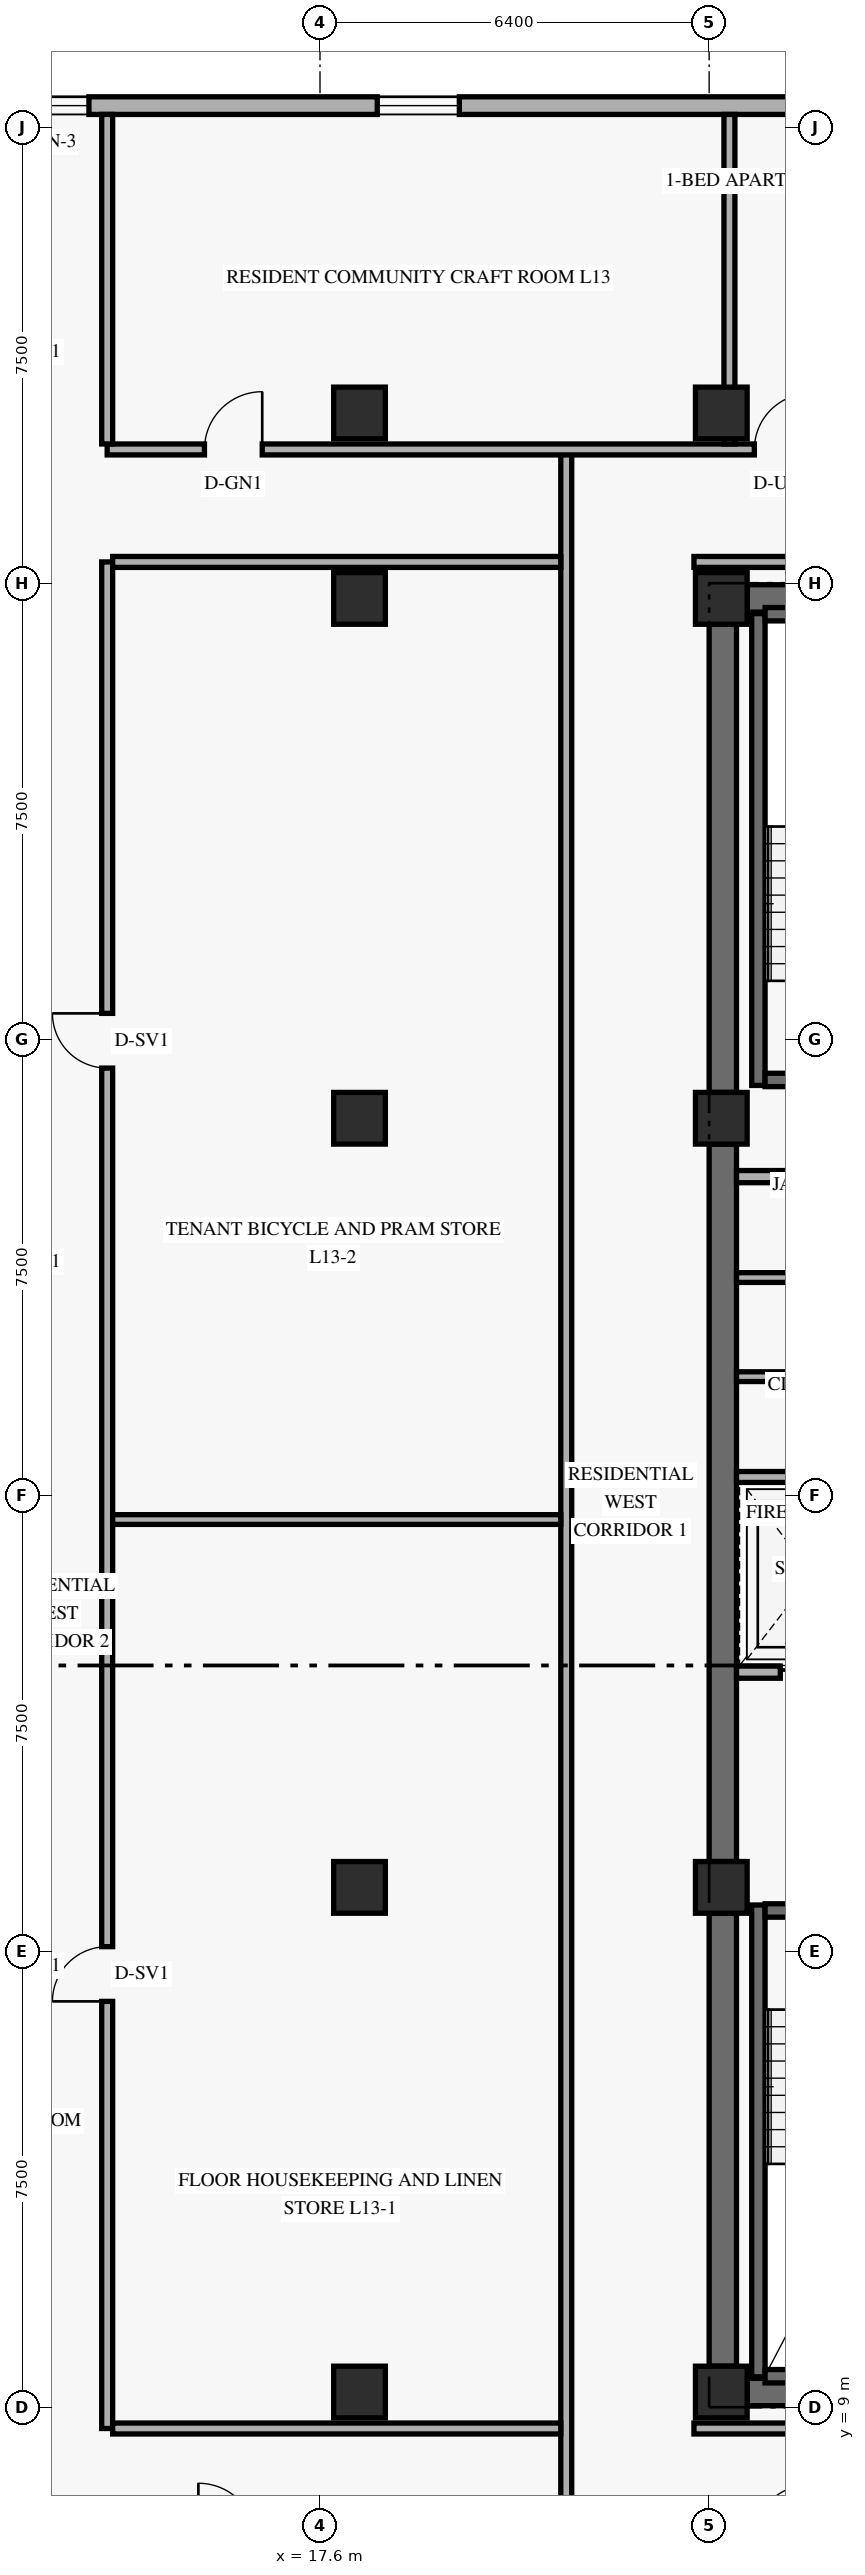
"""IFC4 building model, lengths in metres.
Left out: names, types, materials, properties, quantities, classifications, styles, units other than length and angle.
Written with IfcOpenShell. Run it as: python <this file> out.ifc"""

import sys

from ifc_helpers import new_model, si_unit, direction, frame, frame_2d, origin, origin_2d, place, context, subcontext, project, spatial, rectangle, extrude, element, fill, save


model = new_model("IFC4")
c1 = context("Model", 3, precision=1e-05, world=origin(), true_north=direction((0.0, 1.0)))
c2 = subcontext(c1, "Body", "Model", "MODEL_VIEW")
j1 = project(units=[si_unit("LENGTHUNIT", "METRE"), si_unit("PLANEANGLEUNIT", "RADIAN")], contexts=[c1])
p1 = place(None, origin())
s1 = spatial("IfcSite", under=j1, at=p1, CompositionType="ELEMENT")
p2 = place(p1, origin())
s2 = spatial("IfcBuilding", under=s1, at=p2, CompositionType="ELEMENT")
p3 = place(p2, frame((0.0, 0.0, 52.8)))
s3 = spatial("IfcBuildingStorey", under=s2, at=p3, CompositionType="ELEMENT", Elevation=52.8)
p4 = place(p3, frame((24.225, 9.675, 0.0), z_axis=(0.0, 0.0, 1.0), x_axis=(0.0, 1.0, 0.0)))
e1 = element("IfcWall", 1, at=p4, inside=s3, PredefinedType="SHEAR", context=c2, shape_type="SweptSolid", body=[
    extrude(rectangle(XDim=7.45, YDim=0.45, at=frame_2d((3.725, 0.0))), origin(), (0.0, 0.0, 1.0), 2.667),
])
p5 = place(p3, frame((24.225, 17.975, 0.0), z_axis=(0.0, 0.0, 1.0), x_axis=(0.0, 1.0, 0.0)))
e2 = element("IfcWall", 2, at=p5, inside=s3, PredefinedType="SHEAR", context=c2, shape_type="SweptSolid", body=[
    extrude(rectangle(XDim=11.8, YDim=0.45, at=frame_2d((5.9, 0.0))), origin(), (0.0, 0.0, 1.0), 2.667),
])
p6 = place(p3, frame((24.225, 30.625, 0.0), z_axis=(0.0, 0.0, 1.0), x_axis=(0.0, 1.0, 0.0)))
e3 = element("IfcWall", 3, at=p6, inside=s3, PredefinedType="SHEAR", context=c2, shape_type="SweptSolid", body=[
    extrude(rectangle(XDim=7.7, YDim=0.45, at=frame_2d((3.85, 0.0))), origin(), (0.0, 0.0, 1.0), 2.667),
])
for number, where, z_axis, x_axis in (
    (4, (24.625, 9.25, 0.0), (0.0, 0.0, 1.0), (1.0, 0.0, 0.0)),
    (5, (24.625, 38.75, 0.0), (0.0, 0.0, 1.0), (1.0, 0.0, 0.0)),
):
    element("IfcWall", number, at=place(p3, frame(where, z_axis=z_axis, x_axis=x_axis)), inside=s3, PredefinedType="SHEAR", context=c2, shape_type="SweptSolid", body=[
        extrude(rectangle(XDim=10.15, YDim=0.45, at=frame_2d((5.075, 0.0))), origin(), (0.0, 0.0, 1.0), 3.36),
    ])
p7 = place(p3, frame((24.81, 9.5, 0.0), z_axis=(0.0, 0.0, 1.0), x_axis=(0.0, 1.0, 0.0)))
e6 = element("IfcWall", 6, at=p7, inside=s3, PredefinedType="SHEAR", context=c2, shape_type="SweptSolid", body=[
    extrude(rectangle(XDim=7.76, YDim=0.22, at=frame_2d((3.88, 0.0))), origin(), (0.0, 0.0, 1.0), 3.36),
])
p8 = place(p3, frame((24.92, 9.51, 0.0), z_axis=(0.0, 0.0, 1.0), x_axis=(1.0, 0.0, 0.0)))
e7 = element("IfcWall", 7, at=p8, inside=s3, PredefinedType="SHEAR", context=c2, shape_type="SweptSolid", body=[
    extrude(rectangle(XDim=3.16, YDim=0.22, at=frame_2d((1.58, 0.0))), origin(), (0.0, 0.0, 1.0), 3.36),
])
p9 = place(p3, frame((24.92, 17.17, 0.0), z_axis=(0.0, 0.0, 1.0), x_axis=(1.0, 0.0, 0.0)))
e8 = element("IfcWall", 8, at=p9, inside=s3, PredefinedType="SHEAR", context=c2, shape_type="SweptSolid", body=[
    extrude(rectangle(XDim=3.16, YDim=0.22, at=frame_2d((1.58, 0.0))), origin(), (0.0, 0.0, 1.0), 3.36),
])
p10 = place(p9, frame((0.78, 0.0, 0.0)))
e9 = element("IfcOpeningElement", 9, at=p10, cuts=e8, PredefinedType="OPENING", context=c2, shape_type="SweptSolid", body=[
    extrude(rectangle(XDim=1.05, YDim=2.15, at=frame_2d((0.525, 1.075))), frame((0.0, 0.12, 0.0), z_axis=(0.0, -1.0, 0.0), x_axis=(1.0, 0.0, 0.0)), (0.0, 0.0, 1.0), 0.24),
])
p11 = place(p3, frame((24.81, 30.74, 0.0), z_axis=(0.0, 0.0, 1.0), x_axis=(0.0, 1.0, 0.0)))
e10 = element("IfcWall", 10, at=p11, inside=s3, PredefinedType="SHEAR", context=c2, shape_type="SweptSolid", body=[
    extrude(rectangle(XDim=7.76, YDim=0.22, at=frame_2d((3.88, 0.0))), origin(), (0.0, 0.0, 1.0), 3.36),
])
p12 = place(p3, frame((24.92, 30.83, 0.0), z_axis=(0.0, 0.0, 1.0), x_axis=(1.0, 0.0, 0.0)))
e11 = element("IfcWall", 11, at=p12, inside=s3, PredefinedType="SHEAR", context=c2, shape_type="SweptSolid", body=[
    extrude(rectangle(XDim=3.16, YDim=0.22, at=frame_2d((1.58, 0.0))), origin(), (0.0, 0.0, 1.0), 3.36),
])
p13 = place(p12, frame((0.78, 0.0, 0.0)))
e12 = element("IfcOpeningElement", 12, at=p13, cuts=e11, PredefinedType="OPENING", context=c2, shape_type="SweptSolid", body=[
    extrude(rectangle(XDim=1.05, YDim=2.15, at=frame_2d((0.525, 1.075))), frame((0.0, 0.12, 0.0), z_axis=(0.0, -1.0, 0.0), x_axis=(1.0, 0.0, 0.0)), (0.0, 0.0, 1.0), 0.24),
])
p14 = place(p3, frame((24.92, 38.49, 0.0), z_axis=(0.0, 0.0, 1.0), x_axis=(1.0, 0.0, 0.0)))
e13 = element("IfcWall", 13, at=p14, inside=s3, PredefinedType="SHEAR", context=c2, shape_type="SweptSolid", body=[
    extrude(rectangle(XDim=3.16, YDim=0.22, at=frame_2d((1.58, 0.0))), origin(), (0.0, 0.0, 1.0), 3.36),
])
for number, where, z_axis, x_axis in (
    (14, (18.25, 9.25, 0.0), (0.0, 0.0, 1.0), (1.0, 0.0, 0.0)),
    (15, (18.25, 17.55, 0.0), (0.0, 0.0, 1.0), (1.0, 0.0, 0.0)),
    (16, (18.25, 30.2, 0.0), (0.0, 0.0, 1.0), (1.0, 0.0, 0.0)),
    (17, (18.25, 38.75, 0.0), (0.0, 0.0, 1.0), (1.0, 0.0, 0.0)),
    (18, (18.25, 41.8, 0.0), (0.0, 0.0, 1.0), (1.0, 0.0, 0.0)),
    (19, (24.2, 9.25, 0.0), (0.0, 0.0, 1.0), (1.0, 0.0, 0.0)),
    (20, (24.2, 17.55, 0.0), (0.0, 0.0, 1.0), (1.0, 0.0, 0.0)),
    (21, (24.2, 30.2, 0.0), (0.0, 0.0, 1.0), (1.0, 0.0, 0.0)),
    (22, (24.2, 38.75, 0.0), (0.0, 0.0, 1.0), (1.0, 0.0, 0.0)),
    (23, (24.2, 41.8, 0.0), (0.0, 0.0, 1.0), (1.0, 0.0, 0.0)),
):
    element("IfcColumn", number, at=place(p3, frame(where, z_axis=z_axis, x_axis=x_axis)), inside=s3, PredefinedType="COLUMN", context=c2, shape_type="SweptSolid", body=[
        extrude(rectangle(XDim=0.85, YDim=0.85, at=origin_2d()), origin(), (0.0, 0.0, 1.0), 3.6),
    ])
p15 = place(p3, frame((44.98, 46.855, 0.0), z_axis=(0.0, 0.0, 1.0), x_axis=(-1.0, 0.0, 0.0)))
e24 = element("IfcWall", 24, at=p15, inside=s3, PredefinedType="SOLIDWALL", context=c2, shape_type="SweptSolid", body=[
    extrude(rectangle(XDim=39.56, YDim=0.29, at=frame_2d((19.78, 0.0))), origin(), (0.0, 0.0, 1.0), 3.36),
])
p16 = place(p15, frame((35.445, 0.0, 0.85)))
e25 = element("IfcOpeningElement", 25, at=p16, cuts=e24, PredefinedType="OPENING", context=c2, shape_type="SweptSolid", body=[
    extrude(rectangle(XDim=1.35, YDim=1.55, at=frame_2d((0.675, 0.775))), frame((0.0, 0.155, 0.0), z_axis=(0.0, -1.0, 0.0), x_axis=(1.0, 0.0, 0.0)), (0.0, 0.0, 1.0), 0.31),
])
p17 = place(p15, frame((31.18, 0.0, 0.85)))
e26 = element("IfcOpeningElement", 26, at=p17, cuts=e24, PredefinedType="OPENING", context=c2, shape_type="SweptSolid", body=[
    extrude(rectangle(XDim=1.2, YDim=1.5, at=frame_2d((0.6, 0.75))), frame((0.0, 0.155, 0.0), z_axis=(0.0, -1.0, 0.0), x_axis=(1.0, 0.0, 0.0)), (0.0, 0.0, 1.0), 0.31),
])
p18 = place(p15, frame((25.088, 0.0, 0.85)))
e27 = element("IfcOpeningElement", 27, at=p18, cuts=e24, PredefinedType="OPENING", context=c2, shape_type="SweptSolid", body=[
    extrude(rectangle(XDim=1.35, YDim=1.55, at=frame_2d((0.675, 0.775))), frame((0.0, 0.155, 0.0), z_axis=(0.0, -1.0, 0.0), x_axis=(1.0, 0.0, 0.0)), (0.0, 0.0, 1.0), 0.31),
])
p19 = place(p15, frame((16.498, 0.0, 0.85)))
e28 = element("IfcOpeningElement", 28, at=p19, cuts=e24, PredefinedType="OPENING", context=c2, shape_type="SweptSolid", body=[
    extrude(rectangle(XDim=1.35, YDim=1.55, at=frame_2d((0.675, 0.775))), frame((0.0, 0.155, 0.0), z_axis=(0.0, -1.0, 0.0), x_axis=(1.0, 0.0, 0.0)), (0.0, 0.0, 1.0), 0.31),
])
p20 = place(p15, frame((10.955, 0.0, 0.85)))
e29 = element("IfcOpeningElement", 29, at=p20, cuts=e24, PredefinedType="OPENING", context=c2, shape_type="SweptSolid", body=[
    extrude(rectangle(XDim=1.35, YDim=1.55, at=frame_2d((0.675, 0.775))), frame((0.0, 0.155, 0.0), z_axis=(0.0, -1.0, 0.0), x_axis=(1.0, 0.0, 0.0)), (0.0, 0.0, 1.0), 0.31),
])
p21 = place(p15, frame((7.82, 0.0, 0.85)))
e30 = element("IfcOpeningElement", 30, at=p21, cuts=e24, PredefinedType="OPENING", context=c2, shape_type="SweptSolid", body=[
    extrude(rectangle(XDim=1.35, YDim=1.55, at=frame_2d((0.675, 0.775))), frame((0.0, 0.155, 0.0), z_axis=(0.0, -1.0, 0.0), x_axis=(1.0, 0.0, 0.0)), (0.0, 0.0, 1.0), 0.31),
])
p22 = place(p15, frame((4.008, 0.0, 0.85)))
e31 = element("IfcOpeningElement", 31, at=p22, cuts=e24, PredefinedType="OPENING", context=c2, shape_type="SweptSolid", body=[
    extrude(rectangle(XDim=1.35, YDim=1.55, at=frame_2d((0.675, 0.775))), frame((0.0, 0.155, 0.0), z_axis=(0.0, -1.0, 0.0), x_axis=(1.0, 0.0, 0.0)), (0.0, 0.0, 1.0), 0.31),
])
p23 = place(p15, frame((0.292, 0.0, 0.85)))
e32 = element("IfcOpeningElement", 32, at=p23, cuts=e24, PredefinedType="OPENING", context=c2, shape_type="SweptSolid", body=[
    extrude(rectangle(XDim=1.35, YDim=1.55, at=frame_2d((0.675, 0.775))), frame((0.0, 0.155, 0.0), z_axis=(0.0, -1.0, 0.0), x_axis=(1.0, 0.0, 0.0)), (0.0, 0.0, 1.0), 0.31),
])
p24 = place(p3, frame((24.45, 21.09, 0.0), z_axis=(0.0, 0.0, 1.0), x_axis=(1.0, 0.0, 0.0)))
e33 = element("IfcWall", 33, at=p24, inside=s3, PredefinedType="STANDARD", context=c2, shape_type="SweptSolid", body=[
    extrude(rectangle(XDim=6.83, YDim=0.2, at=frame_2d((3.415, 0.0))), origin(), (0.0, 0.0, 1.0), 3.36),
])
p25 = place(p24, frame((0.72, 0.0, 0.0)))
e34 = element("IfcOpeningElement", 34, at=p25, cuts=e33, PredefinedType="OPENING", context=c2, shape_type="SweptSolid", body=[
    extrude(rectangle(XDim=1.1, YDim=2.2, at=frame_2d((0.55, 1.1))), frame((0.0, 0.11, 0.0), z_axis=(0.0, -1.0, 0.0), x_axis=(1.0, 0.0, 0.0)), (0.0, 0.0, 1.0), 0.22),
])
p26 = place(p24, frame((3.32, 0.0, 0.0)))
e35 = element("IfcOpeningElement", 35, at=p26, cuts=e33, PredefinedType="OPENING", context=c2, shape_type="SweptSolid", body=[
    extrude(rectangle(XDim=1.1, YDim=2.2, at=frame_2d((0.55, 1.1))), frame((0.0, 0.11, 0.0), z_axis=(0.0, -1.0, 0.0), x_axis=(1.0, 0.0, 0.0)), (0.0, 0.0, 1.0), 0.22),
])
p27 = place(p3, frame((24.45, 24.3, 0.0), z_axis=(0.0, 0.0, 1.0), x_axis=(1.0, 0.0, 0.0)))
e36 = element("IfcWall", 36, at=p27, inside=s3, PredefinedType="STANDARD", context=c2, shape_type="SweptSolid", body=[
    extrude(rectangle(XDim=6.83, YDim=0.18, at=frame_2d((3.415, 0.0))), origin(), (0.0, 0.0, 1.0), 3.36),
])
p28 = place(p3, frame((24.45, 29.24, 0.0), z_axis=(0.0, 0.0, 1.0), x_axis=(1.0, 0.0, 0.0)))
e37 = element("IfcWall", 37, at=p28, inside=s3, PredefinedType="STANDARD", context=c2, shape_type="SweptSolid", body=[
    extrude(rectangle(XDim=3.65, YDim=0.2, at=frame_2d((1.825, 0.0))), origin(), (0.0, 0.0, 1.0), 3.36),
])
for number, where, z_axis, x_axis in (
    (38, (24.45, 25.95, 0.0), (0.0, 0.0, 1.0), (1.0, 0.0, 0.0)),
    (39, (24.45, 27.58, 0.0), (0.0, 0.0, 1.0), (1.0, 0.0, 0.0)),
):
    element("IfcWall", number, at=place(p3, frame(where, z_axis=z_axis, x_axis=x_axis)), inside=s3, PredefinedType="PARTITIONING", context=c2, shape_type="SweptSolid", body=[
        extrude(rectangle(XDim=3.55, YDim=0.16, at=frame_2d((1.775, 0.0))), origin(), (0.0, 0.0, 1.0), 3.36),
    ])
p29 = place(p3, frame((21.65, 6.8, 0.0), z_axis=(0.0, 0.0, 1.0), x_axis=(0.0, 1.0, 0.0)))
e40 = element("IfcWall", 40, at=p29, inside=s3, PredefinedType="STANDARD", context=c2, shape_type="SweptSolid", body=[
    extrude(rectangle(XDim=34.4, YDim=0.18, at=frame_2d((17.2, 0.0))), origin(), (0.0, 0.0, 1.0), 2.649),
])
p30 = place(p3, frame((23.75, 8.65, 0.0), z_axis=(0.0, 0.0, 1.0), x_axis=(1.0, 0.0, 0.0)))
e41 = element("IfcWall", 41, at=p30, inside=s3, PredefinedType="STANDARD", context=c2, shape_type="SweptSolid", body=[
    extrude(rectangle(XDim=11.67, YDim=0.18, at=frame_2d((5.835, 0.0))), origin(), (0.0, 0.0, 1.0), 2.649),
])
p31 = place(p3, frame((14.1, 41.2, 0.0), z_axis=(0.0, 0.0, 1.0), x_axis=(1.0, 0.0, 0.0)))
e42 = element("IfcWall", 42, at=p31, inside=s3, PredefinedType="STANDARD", context=c2, shape_type="SweptSolid", body=[
    extrude(rectangle(XDim=21.32, YDim=0.18, at=frame_2d((10.66, 0.0))), origin(), (0.0, 0.0, 1.0), 2.649),
])
p32 = place(p31, frame((1.6, 0.0, 0.0)))
e43 = element("IfcOpeningElement", 43, at=p32, cuts=e42, PredefinedType="OPENING", context=c2, shape_type="SweptSolid", body=[
    extrude(rectangle(XDim=0.95, YDim=2.15, at=frame_2d((0.475, 1.075))), frame((0.0, 0.1, 0.0), z_axis=(0.0, -1.0, 0.0), x_axis=(1.0, 0.0, 0.0)), (0.0, 0.0, 1.0), 0.2),
])
p33 = place(p31, frame((10.644, 0.0, 0.0)))
e44 = element("IfcOpeningElement", 44, at=p33, cuts=e42, PredefinedType="OPENING", context=c2, shape_type="SweptSolid", body=[
    extrude(rectangle(XDim=0.92, YDim=2.15, at=frame_2d((0.46, 1.075))), frame((0.0, 0.1, 0.0), z_axis=(0.0, -1.0, 0.0), x_axis=(1.0, 0.0, 0.0)), (0.0, 0.0, 1.0), 0.2),
])
p34 = place(p3, frame((23.75, 39.35, 0.0), z_axis=(0.0, 0.0, 1.0), x_axis=(1.0, 0.0, 0.0)))
e45 = element("IfcWall", 45, at=p34, inside=s3, PredefinedType="STANDARD", context=c2, shape_type="SweptSolid", body=[
    extrude(rectangle(XDim=11.67, YDim=0.18, at=frame_2d((5.835, 0.0))), origin(), (0.0, 0.0, 1.0), 2.649),
])
p35 = place(p3, frame((14.1, 8.65, 0.0), z_axis=(0.0, 0.0, 1.0), x_axis=(0.0, 1.0, 0.0)))
e46 = element("IfcWall", 46, at=p35, inside=s3, PredefinedType="STANDARD", context=c2, shape_type="SweptSolid", body=[
    extrude(rectangle(XDim=30.7, YDim=0.18, at=frame_2d((15.35, 0.0))), origin(), (0.0, 0.0, 1.0), 2.649),
])
p36 = place(p35, frame((7.025, 0.0, 0.0)))
e47 = element("IfcOpeningElement", 47, at=p36, cuts=e46, PredefinedType="OPENING", context=c2, shape_type="SweptSolid", body=[
    extrude(rectangle(XDim=0.9, YDim=2.1, at=frame_2d((0.45, 1.05))), frame((0.0, 0.1, 0.0), z_axis=(0.0, -1.0, 0.0), x_axis=(1.0, 0.0, 0.0)), (0.0, 0.0, 1.0), 0.2),
])
p37 = place(p35, frame((22.375, 0.0, 0.0)))
e48 = element("IfcOpeningElement", 48, at=p37, cuts=e46, PredefinedType="OPENING", context=c2, shape_type="SweptSolid", body=[
    extrude(rectangle(XDim=0.9, YDim=2.1, at=frame_2d((0.45, 1.05))), frame((0.0, 0.1, 0.0), z_axis=(0.0, -1.0, 0.0), x_axis=(1.0, 0.0, 0.0)), (0.0, 0.0, 1.0), 0.2),
])
for number, where, z_axis, x_axis in (
    (49, (14.19, 8.65, 0.0), (0.0, 0.0, 1.0), (1.0, 0.0, 0.0)),
    (50, (14.19, 39.35, 0.0), (0.0, 0.0, 1.0), (1.0, 0.0, 0.0)),
):
    element("IfcWall", number, at=place(p3, frame(where, z_axis=z_axis, x_axis=x_axis)), inside=s3, PredefinedType="STANDARD", context=c2, shape_type="SweptSolid", body=[
        extrude(rectangle(XDim=7.37, YDim=0.18, at=frame_2d((3.685, 0.0))), origin(), (0.0, 0.0, 1.0), 2.649),
    ])
p38 = place(p3, frame((14.1, 41.29, 0.0), z_axis=(0.0, 0.0, 1.0), x_axis=(0.0, 1.0, 0.0)))
e51 = element("IfcWall", 51, at=p38, inside=s3, PredefinedType="PARTITIONING", context=c2, shape_type="SweptSolid", body=[
    extrude(rectangle(XDim=5.42, YDim=0.18, at=frame_2d((2.71, 0.0))), origin(), (0.0, 0.0, 1.0), 2.809),
])
p39 = place(p3, frame((14.19, 23.6, 0.0), z_axis=(0.0, 0.0, 1.0), x_axis=(1.0, 0.0, 0.0)))
e52 = element("IfcWall", 52, at=p39, inside=s3, PredefinedType="PARTITIONING", context=c2, shape_type="SweptSolid", body=[
    extrude(rectangle(XDim=7.37, YDim=0.16, at=frame_2d((3.685, 0.0))), origin(), (0.0, 0.0, 1.0), 2.649),
])
p40 = place(p3, frame((24.333, 41.29, 0.0), z_axis=(0.0, 0.0, 1.0), x_axis=(0.0, 1.0, 0.0)))
e53 = element("IfcWall", 53, at=p40, inside=s3, PredefinedType="PARTITIONING", context=c2, shape_type="SweptSolid", body=[
    extrude(rectangle(XDim=5.42, YDim=0.18, at=frame_2d((2.71, 0.0))), origin(), (0.0, 0.0, 1.0), 2.649),
])
p41 = place(p17, origin())
e54 = element("IfcWindow", 54, at=p41, inside=s3, PartitioningType="SINGLE_PANEL", PredefinedType="WINDOW", context=c2, shape_type="SweptSolid", body=[
    extrude(rectangle(XDim=1.2, YDim=1.5, at=frame_2d((0.6, 0.75))), frame((0.0, 0.03, 0.0), z_axis=(0.0, -1.0, 0.0), x_axis=(1.0, 0.0, 0.0)), (0.0, 0.0, 1.0), 0.06),
])
fill(e26, e54)
p42 = place(p18, origin())
e55 = element("IfcWindow", 55, at=p42, inside=s3, PartitioningType="SINGLE_PANEL", PredefinedType="WINDOW", context=c2, shape_type="SweptSolid", body=[
    extrude(rectangle(XDim=1.35, YDim=1.55, at=frame_2d((0.675, 0.775))), frame((0.0, 0.03, 0.0), z_axis=(0.0, -1.0, 0.0), x_axis=(1.0, 0.0, 0.0)), (0.0, 0.0, 1.0), 0.06),
])
fill(e27, e55)
p43 = place(p25, origin())
e56 = element("IfcDoor", 56, at=p43, inside=s3, OperationType="SLIDING_TO_LEFT", PredefinedType="DOOR", context=c2, shape_type="SweptSolid", body=[
    extrude(rectangle(XDim=1.1, YDim=2.2, at=frame_2d((0.55, 1.1))), frame((0.0, 0.025, 0.0), z_axis=(0.0, -1.0, 0.0), x_axis=(1.0, 0.0, 0.0)), (0.0, 0.0, 1.0), 0.05),
])
fill(e34, e56)
p44 = place(p36, origin())
e57 = element("IfcDoor", 57, at=p44, inside=s3, OperationType="SINGLE_SWING_LEFT", PredefinedType="DOOR", context=c2, shape_type="SweptSolid", body=[
    extrude(rectangle(XDim=0.9, YDim=2.1, at=frame_2d((0.45, 1.05))), frame((0.0, 0.025, 0.0), z_axis=(0.0, -1.0, 0.0), x_axis=(1.0, 0.0, 0.0)), (0.0, 0.0, 1.0), 0.05),
])
fill(e47, e57)
p45 = place(p37, origin())
e58 = element("IfcDoor", 58, at=p45, inside=s3, OperationType="SINGLE_SWING_RIGHT", PredefinedType="DOOR", context=c2, shape_type="SweptSolid", body=[
    extrude(rectangle(XDim=0.9, YDim=2.1, at=frame_2d((0.45, 1.05))), frame((0.0, 0.025, 0.0), z_axis=(0.0, -1.0, 0.0), x_axis=(1.0, 0.0, 0.0)), (0.0, 0.0, 1.0), 0.05),
])
fill(e48, e58)
p46 = place(p32, origin())
e59 = element("IfcDoor", 59, at=p46, inside=s3, OperationType="SINGLE_SWING_RIGHT", PredefinedType="DOOR", context=c2, shape_type="SweptSolid", body=[
    extrude(rectangle(XDim=0.95, YDim=2.15, at=frame_2d((0.475, 1.075))), frame((0.0, 0.025, 0.0), z_axis=(0.0, -1.0, 0.0), x_axis=(1.0, 0.0, 0.0)), (0.0, 0.0, 1.0), 0.05),
])
fill(e43, e59)
p47 = place(p33, origin())
e60 = element("IfcDoor", 60, at=p47, inside=s3, OperationType="SINGLE_SWING_RIGHT", PredefinedType="DOOR", context=c2, shape_type="SweptSolid", body=[
    extrude(rectangle(XDim=0.92, YDim=2.15, at=frame_2d((0.46, 1.075))), frame((0.0, 0.025, 0.0), z_axis=(0.0, -1.0, 0.0), x_axis=(1.0, 0.0, 0.0)), (0.0, 0.0, 1.0), 0.05),
])
fill(e44, e60)
save(model, sys.argv[1])
